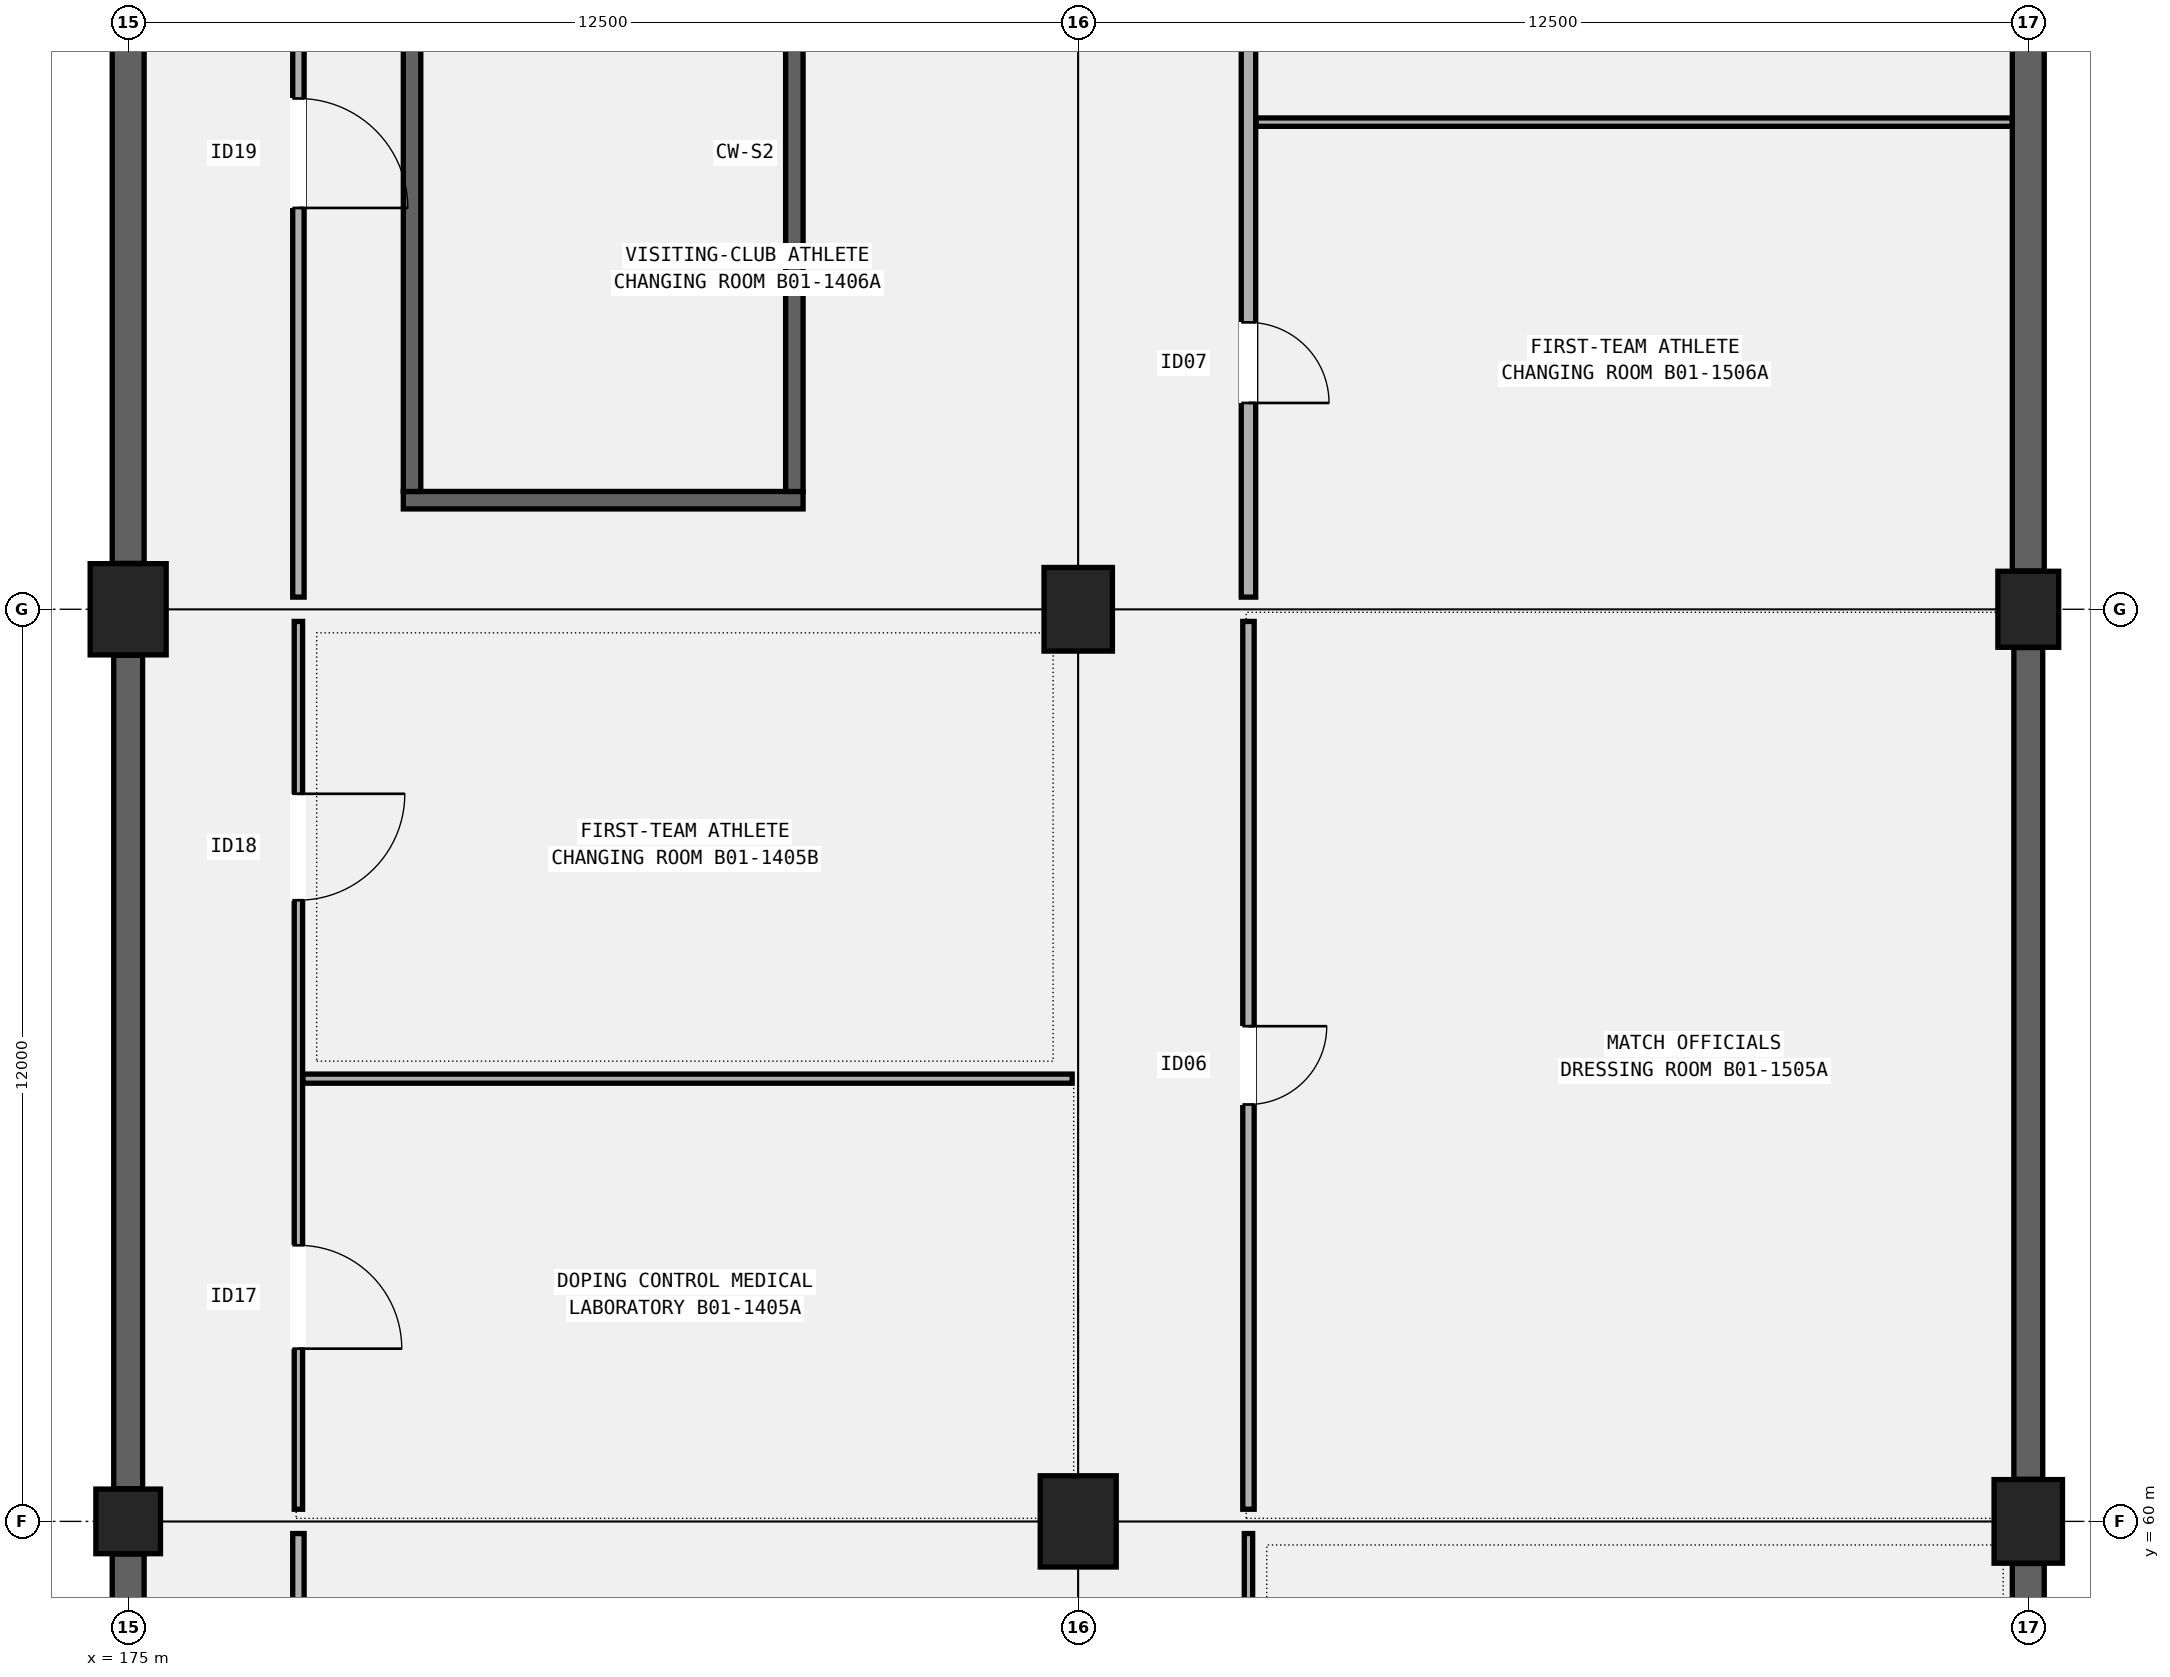
"""IFC4 building model, lengths in metres.
Left out: names, types, materials, properties, quantities, classifications, styles, units other than length and angle.
Written with IfcOpenShell. Run it as: python <this file> out.ifc"""

import sys

from ifc_helpers import new_model, si_unit, direction, frame, frame_2d, origin, origin_2d, place, context, subcontext, project, spatial, rectangle, circle, extrude, element, fill, save


model = new_model("IFC4")
c1 = context("Model", 3, precision=1e-05, world=origin(), true_north=direction((0.0, 1.0)))
c2 = subcontext(c1, "Body", "Model", "MODEL_VIEW")
j1 = project(units=[si_unit("LENGTHUNIT", "METRE"), si_unit("PLANEANGLEUNIT", "RADIAN")], contexts=[c1])
p1 = place(None, origin())
s1 = spatial("IfcSite", under=j1, at=p1, CompositionType="ELEMENT")
p2 = place(p1, origin())
s2 = spatial("IfcBuilding", under=s1, at=p2, CompositionType="ELEMENT")
p3 = place(p2, frame((0.0, 0.0, -4.8)))
s3 = spatial("IfcBuildingStorey", under=s2, at=p3, CompositionType="ELEMENT", Elevation=-4.8)
p4 = place(p3, frame((175.0, 60.0, 0.0), z_axis=(0.0, 0.0, 1.0), x_axis=(1.0, 0.0, 0.0)))
e1 = element("IfcColumn", 1, at=p4, inside=s3, PredefinedType="COLUMN", context=c2, shape_type="SweptSolid", body=[
    extrude(circle(Radius=0.425, at=origin_2d()), origin(), (0.0, 0.0, 1.0), 4.8),
])
for number, where, z_axis, x_axis in (
    (2, (175.0, 72.0, 0.0), (0.0, 0.0, 1.0), (1.0, 0.0, 0.0)),
    (3, (187.5, 60.0, 0.0), (0.0, 0.0, 1.0), (1.0, 0.0, 0.0)),
):
    element("IfcColumn", number, at=place(p3, frame(where, z_axis=z_axis, x_axis=x_axis)), inside=s3, PredefinedType="COLUMN", context=c2, shape_type="SweptSolid", body=[
        extrude(rectangle(XDim=1.0, YDim=1.2, at=origin_2d()), origin(), (0.0, 0.0, 1.0), 4.8),
    ])
for number, where, z_axis, x_axis in (
    (4, (187.5, 72.0, 0.0), (0.0, 0.0, 1.0), (1.0, 0.0, 0.0)),
    (5, (200.0, 60.0, 0.0), (0.0, 0.0, 1.0), (1.0, 0.0, 0.0)),
):
    element("IfcColumn", number, at=place(p3, frame(where, z_axis=z_axis, x_axis=x_axis)), inside=s3, PredefinedType="COLUMN", context=c2, shape_type="SweptSolid", body=[
        extrude(rectangle(XDim=0.9, YDim=1.1, at=origin_2d()), origin(), (0.0, 0.0, 1.0), 4.8),
    ])
p5 = place(p3, frame((200.0, 72.0, 0.0), z_axis=(0.0, 0.0, 1.0), x_axis=(1.0, 0.0, 0.0)))
e6 = element("IfcColumn", 6, at=p5, inside=s3, PredefinedType="COLUMN", context=c2, shape_type="SweptSolid", body=[
    extrude(rectangle(XDim=0.8, YDim=1.0, at=origin_2d()), origin(), (0.0, 0.0, 1.0), 4.8),
])
p6 = place(p3, frame((175.0, 48.504, 0.0), z_axis=(0.0, 0.0, 1.0), x_axis=(0.0, 1.0, 0.0)))
e7 = element("IfcWall", 7, at=p6, inside=s3, PredefinedType="STANDARD", context=c2, shape_type="SweptSolid", body=[
    extrude(rectangle(XDim=11.067, YDim=0.42, at=frame_2d((5.534, 0.0))), origin(), (0.0, 0.0, 1.0), 4.46),
])
p7 = place(p3, frame((175.0, 60.429, 0.0), z_axis=(0.0, 0.0, 1.0), x_axis=(0.0, 1.0, 0.0)))
e8 = element("IfcWall", 8, at=p7, inside=s3, PredefinedType="STANDARD", context=c2, shape_type="SweptSolid", body=[
    extrude(rectangle(XDim=10.967, YDim=0.38, at=frame_2d((5.483, 0.0))), origin(), (0.0, 0.0, 1.0), 4.46),
])
for number, where, z_axis, x_axis in (
    (9, (175.0, 72.604, 0.0), (0.0, 0.0, 1.0), (0.0, 1.0, 0.0)),
    (10, (200.0, 48.604, 0.0), (0.0, 0.0, 1.0), (0.0, 1.0, 0.0)),
):
    element("IfcWall", number, at=place(p3, frame(where, z_axis=z_axis, x_axis=x_axis)), inside=s3, PredefinedType="STANDARD", context=c2, shape_type="SweptSolid", body=[
        extrude(rectangle(XDim=10.842, YDim=0.42, at=frame_2d((5.421, 0.0))), origin(), (0.0, 0.0, 1.0), 4.46),
    ])
p8 = place(p3, frame((200.0, 60.554, 0.0), z_axis=(0.0, 0.0, 1.0), x_axis=(0.0, 1.0, 0.0)))
e11 = element("IfcWall", 11, at=p8, inside=s3, PredefinedType="STANDARD", context=c2, shape_type="SweptSolid", body=[
    extrude(rectangle(XDim=10.942, YDim=0.38, at=frame_2d((5.471, 0.0))), origin(), (0.0, 0.0, 1.0), 4.46),
])
p9 = place(p3, frame((200.0, 72.504, 0.0), z_axis=(0.0, 0.0, 1.0), x_axis=(0.0, 1.0, 0.0)))
e12 = element("IfcWall", 12, at=p9, inside=s3, PredefinedType="STANDARD", context=c2, shape_type="SweptSolid", body=[
    extrude(rectangle(XDim=11.067, YDim=0.42, at=frame_2d((5.534, 0.0))), origin(), (0.0, 0.0, 1.0), 4.46),
])
p10 = place(p3, frame((178.62, 73.435, 0.0), z_axis=(0.0, 0.0, 1.0), x_axis=(1.0, 0.0, 0.0)))
e13 = element("IfcWall", 13, at=p10, inside=s3, PredefinedType="SHEAR", context=c2, shape_type="SweptSolid", body=[
    extrude(rectangle(XDim=5.26, YDim=0.23, at=frame_2d((2.63, 0.0))), origin(), (0.0, 0.0, 1.0), 4.5),
])
for number, where, z_axis, x_axis in (
    (14, (178.735, 73.55, 0.0), (0.0, 0.0, 1.0), (0.0, 1.0, 0.0)),
    (15, (183.765, 73.55, 0.0), (0.0, 0.0, 1.0), (0.0, 1.0, 0.0)),
):
    element("IfcWall", number, at=place(p3, frame(where, z_axis=z_axis, x_axis=x_axis)), inside=s3, PredefinedType="SHEAR", context=c2, shape_type="SweptSolid", body=[
        extrude(rectangle(XDim=8.9, YDim=0.23, at=frame_2d((4.45, 0.0))), origin(), (0.0, 0.0, 1.0), 4.5),
    ])
p11 = place(p3, frame((177.24, 48.16, 0.0), z_axis=(0.0, 0.0, 1.0), x_axis=(0.0, 1.0, 0.0)))
e16 = element("IfcWall", 16, at=p11, inside=s3, PredefinedType="PARTITIONING", context=c2, shape_type="SweptSolid", body=[
    extrude(rectangle(XDim=11.68, YDim=0.15, at=frame_2d((5.84, 0.0))), origin(), (0.0, 0.0, 1.0), 3.92),
])
p12 = place(p11, frame((2.362, 0.0, 0.0), z_axis=(0.0, 0.0, 1.0), x_axis=(-1.0, 0.0, 0.0)))
e17 = element("IfcOpeningElement", 17, at=p12, cuts=e16, PredefinedType="OPENING", context=c2, shape_type="SweptSolid", body=[
    extrude(rectangle(XDim=1.3, YDim=2.24, at=frame_2d((0.65, 1.12))), frame((0.0, 0.085, 0.0), z_axis=(0.0, -1.0, 0.0), x_axis=(1.0, 0.0, 0.0)), (0.0, 0.0, 1.0), 0.17),
])
p13 = place(p11, frame((8.297, 0.0, 0.0), z_axis=(0.0, 0.0, 1.0), x_axis=(-1.0, 0.0, 0.0)))
e18 = element("IfcOpeningElement", 18, at=p13, cuts=e16, PredefinedType="OPENING", context=c2, shape_type="SweptSolid", body=[
    extrude(rectangle(XDim=1.33, YDim=2.22, at=frame_2d((0.665, 1.11))), frame((0.0, 0.085, 0.0), z_axis=(0.0, -1.0, 0.0), x_axis=(1.0, 0.0, 0.0)), (0.0, 0.0, 1.0), 0.17),
])
p14 = place(p3, frame((177.24, 60.16, 0.0), z_axis=(0.0, 0.0, 1.0), x_axis=(0.0, 1.0, 0.0)))
e19 = element("IfcWall", 19, at=p14, inside=s3, PredefinedType="PARTITIONING", context=c2, shape_type="SweptSolid", body=[
    extrude(rectangle(XDim=11.68, YDim=0.11, at=frame_2d((5.84, 0.0))), origin(), (0.0, 0.0, 1.0), 3.92),
])
p15 = place(p14, frame((3.472, 0.0, 0.0), z_axis=(0.0, 0.0, 1.0), x_axis=(-1.0, 0.0, 0.0)))
e20 = element("IfcOpeningElement", 20, at=p15, cuts=e19, PredefinedType="OPENING", context=c2, shape_type="SweptSolid", body=[
    extrude(rectangle(XDim=1.36, YDim=2.25, at=frame_2d((0.68, 1.125))), frame((0.0, 0.065, 0.0), z_axis=(0.0, -1.0, 0.0), x_axis=(1.0, 0.0, 0.0)), (0.0, 0.0, 1.0), 0.13),
])
p16 = place(p14, frame((9.412, 0.0, 0.0), z_axis=(0.0, 0.0, 1.0), x_axis=(-1.0, 0.0, 0.0)))
e21 = element("IfcOpeningElement", 21, at=p16, cuts=e19, PredefinedType="OPENING", context=c2, shape_type="SweptSolid", body=[
    extrude(rectangle(XDim=1.4, YDim=2.24, at=frame_2d((0.7, 1.12))), frame((0.0, 0.065, 0.0), z_axis=(0.0, -1.0, 0.0), x_axis=(1.0, 0.0, 0.0)), (0.0, 0.0, 1.0), 0.13),
])
p17 = place(p3, frame((177.3, 65.825, 0.0), z_axis=(0.0, 0.0, 1.0), x_axis=(1.0, 0.0, 0.0)))
e22 = element("IfcWall", 22, at=p17, inside=s3, PredefinedType="PARTITIONING", context=c2, shape_type="SweptSolid", body=[
    extrude(rectangle(XDim=10.12, YDim=0.12, at=frame_2d((5.06, 0.0))), origin(), (0.0, 0.0, 1.0), 3.92),
])
p18 = place(p3, frame((177.24, 72.16, 0.0), z_axis=(0.0, 0.0, 1.0), x_axis=(0.0, 1.0, 0.0)))
e23 = element("IfcWall", 23, at=p18, inside=s3, PredefinedType="PARTITIONING", context=c2, shape_type="SweptSolid", body=[
    extrude(rectangle(XDim=11.68, YDim=0.15, at=frame_2d((5.84, 0.0))), origin(), (0.0, 0.0, 1.0), 3.92),
])
p19 = place(p18, frame((6.56, 0.0, 0.0), z_axis=(0.0, 0.0, 1.0), x_axis=(-1.0, 0.0, 0.0)))
e24 = element("IfcOpeningElement", 24, at=p19, cuts=e23, PredefinedType="OPENING", context=c2, shape_type="SweptSolid", body=[
    extrude(rectangle(XDim=1.44, YDim=2.26, at=frame_2d((0.72, 1.13))), frame((0.0, 0.085, 0.0), z_axis=(0.0, -1.0, 0.0), x_axis=(1.0, 0.0, 0.0)), (0.0, 0.0, 1.0), 0.17),
])
p20 = place(p3, frame((189.74, 48.16, 0.0), z_axis=(0.0, 0.0, 1.0), x_axis=(0.0, 1.0, 0.0)))
e25 = element("IfcWall", 25, at=p20, inside=s3, PredefinedType="PARTITIONING", context=c2, shape_type="SweptSolid", body=[
    extrude(rectangle(XDim=11.68, YDim=0.11, at=frame_2d((5.84, 0.0))), origin(), (0.0, 0.0, 1.0), 3.92),
])
p21 = place(p20, frame((2.517, 0.0, 0.0), z_axis=(0.0, 0.0, 1.0), x_axis=(-1.0, 0.0, 0.0)))
e26 = element("IfcOpeningElement", 26, at=p21, cuts=e25, PredefinedType="OPENING", context=c2, shape_type="SweptSolid", body=[
    extrude(rectangle(XDim=0.98, YDim=2.1, at=frame_2d((0.49, 1.05))), frame((0.0, 0.065, 0.0), z_axis=(0.0, -1.0, 0.0), x_axis=(1.0, 0.0, 0.0)), (0.0, 0.0, 1.0), 0.13),
])
p22 = place(p20, frame((8.447, 0.0, 0.0), z_axis=(0.0, 0.0, 1.0), x_axis=(-1.0, 0.0, 0.0)))
e27 = element("IfcOpeningElement", 27, at=p22, cuts=e25, PredefinedType="OPENING", context=c2, shape_type="SweptSolid", body=[
    extrude(rectangle(XDim=1.0, YDim=2.14, at=frame_2d((0.5, 1.07))), frame((0.0, 0.065, 0.0), z_axis=(0.0, -1.0, 0.0), x_axis=(1.0, 0.0, 0.0)), (0.0, 0.0, 1.0), 0.13),
])
p23 = place(p3, frame((189.74, 60.16, 0.0), z_axis=(0.0, 0.0, 1.0), x_axis=(0.0, 1.0, 0.0)))
e28 = element("IfcWall", 28, at=p23, inside=s3, PredefinedType="PARTITIONING", context=c2, shape_type="SweptSolid", body=[
    extrude(rectangle(XDim=11.68, YDim=0.15, at=frame_2d((5.84, 0.0))), origin(), (0.0, 0.0, 1.0), 3.92),
])
p24 = place(p23, frame((6.355, 0.0, 0.0), z_axis=(0.0, 0.0, 1.0), x_axis=(-1.0, 0.0, 0.0)))
e29 = element("IfcOpeningElement", 29, at=p24, cuts=e28, PredefinedType="OPENING", context=c2, shape_type="SweptSolid", body=[
    extrude(rectangle(XDim=1.03, YDim=2.12, at=frame_2d((0.515, 1.06))), frame((0.0, 0.085, 0.0), z_axis=(0.0, -1.0, 0.0), x_axis=(1.0, 0.0, 0.0)), (0.0, 0.0, 1.0), 0.17),
])
p25 = place(p3, frame((189.74, 72.16, 0.0), z_axis=(0.0, 0.0, 1.0), x_axis=(0.0, 1.0, 0.0)))
e30 = element("IfcWall", 30, at=p25, inside=s3, PredefinedType="PARTITIONING", context=c2, shape_type="SweptSolid", body=[
    extrude(rectangle(XDim=11.68, YDim=0.19, at=frame_2d((5.84, 0.0))), origin(), (0.0, 0.0, 1.0), 3.92),
])
p26 = place(p25, frame((3.615, 0.0, 0.0), z_axis=(0.0, 0.0, 1.0), x_axis=(-1.0, 0.0, 0.0)))
e31 = element("IfcOpeningElement", 31, at=p26, cuts=e30, PredefinedType="OPENING", context=c2, shape_type="SweptSolid", body=[
    extrude(rectangle(XDim=1.06, YDim=2.15, at=frame_2d((0.53, 1.075))), frame((0.0, 0.105, 0.0), z_axis=(0.0, -1.0, 0.0), x_axis=(1.0, 0.0, 0.0)), (0.0, 0.0, 1.0), 0.21),
])
p27 = place(p25, frame((9.55, 0.0, 0.0), z_axis=(0.0, 0.0, 1.0), x_axis=(-1.0, 0.0, 0.0)))
e32 = element("IfcOpeningElement", 32, at=p27, cuts=e30, PredefinedType="OPENING", context=c2, shape_type="SweptSolid", body=[
    extrude(rectangle(XDim=1.09, YDim=2.16, at=frame_2d((0.545, 1.08))), frame((0.0, 0.105, 0.0), z_axis=(0.0, -1.0, 0.0), x_axis=(1.0, 0.0, 0.0)), (0.0, 0.0, 1.0), 0.21),
])
p28 = place(p3, frame((189.84, 78.409, 0.0), z_axis=(0.0, 0.0, 1.0), x_axis=(1.0, 0.0, 0.0)))
e33 = element("IfcWall", 33, at=p28, inside=s3, PredefinedType="PARTITIONING", context=c2, shape_type="SweptSolid", body=[
    extrude(rectangle(XDim=9.948, YDim=0.11, at=frame_2d((4.974, 0.0))), origin(), (0.0, 0.0, 1.0), 3.92),
])
p29 = place(p15, origin())
e34 = element("IfcDoor", 34, at=p29, inside=s3, OperationType="SINGLE_SWING_RIGHT", PredefinedType="DOOR", context=c2, shape_type="SweptSolid", body=[
    extrude(rectangle(XDim=1.36, YDim=2.25, at=frame_2d((0.68, 1.125))), frame((0.0, 0.025, 0.0), z_axis=(0.0, -1.0, 0.0), x_axis=(1.0, 0.0, 0.0)), (0.0, 0.0, 1.0), 0.05),
])
fill(e20, e34)
p30 = place(p16, origin())
e35 = element("IfcDoor", 35, at=p30, inside=s3, OperationType="SINGLE_SWING_LEFT", PredefinedType="DOOR", context=c2, shape_type="SweptSolid", body=[
    extrude(rectangle(XDim=1.4, YDim=2.24, at=frame_2d((0.7, 1.12))), frame((0.0, 0.025, 0.0), z_axis=(0.0, -1.0, 0.0), x_axis=(1.0, 0.0, 0.0)), (0.0, 0.0, 1.0), 0.05),
])
fill(e21, e35)
p31 = place(p19, origin())
e36 = element("IfcDoor", 36, at=p31, inside=s3, OperationType="SINGLE_SWING_RIGHT", PredefinedType="DOOR", context=c2, shape_type="SweptSolid", body=[
    extrude(rectangle(XDim=1.44, YDim=2.26, at=frame_2d((0.72, 1.13))), frame((0.0, 0.025, 0.0), z_axis=(0.0, -1.0, 0.0), x_axis=(1.0, 0.0, 0.0)), (0.0, 0.0, 1.0), 0.05),
])
fill(e24, e36)
p32 = place(p24, origin())
e37 = element("IfcDoor", 37, at=p32, inside=s3, OperationType="SINGLE_SWING_LEFT", PredefinedType="DOOR", context=c2, shape_type="SweptSolid", body=[
    extrude(rectangle(XDim=1.03, YDim=2.12, at=frame_2d((0.515, 1.06))), frame((0.0, 0.025, 0.0), z_axis=(0.0, -1.0, 0.0), x_axis=(1.0, 0.0, 0.0)), (0.0, 0.0, 1.0), 0.05),
])
fill(e29, e37)
p33 = place(p26, origin())
e38 = element("IfcDoor", 38, at=p33, inside=s3, OperationType="SINGLE_SWING_RIGHT", PredefinedType="DOOR", context=c2, shape_type="SweptSolid", body=[
    extrude(rectangle(XDim=1.06, YDim=2.15, at=frame_2d((0.53, 1.075))), frame((0.0, 0.025, 0.0), z_axis=(0.0, -1.0, 0.0), x_axis=(1.0, 0.0, 0.0)), (0.0, 0.0, 1.0), 0.05),
])
fill(e31, e38)
save(model, sys.argv[1])
